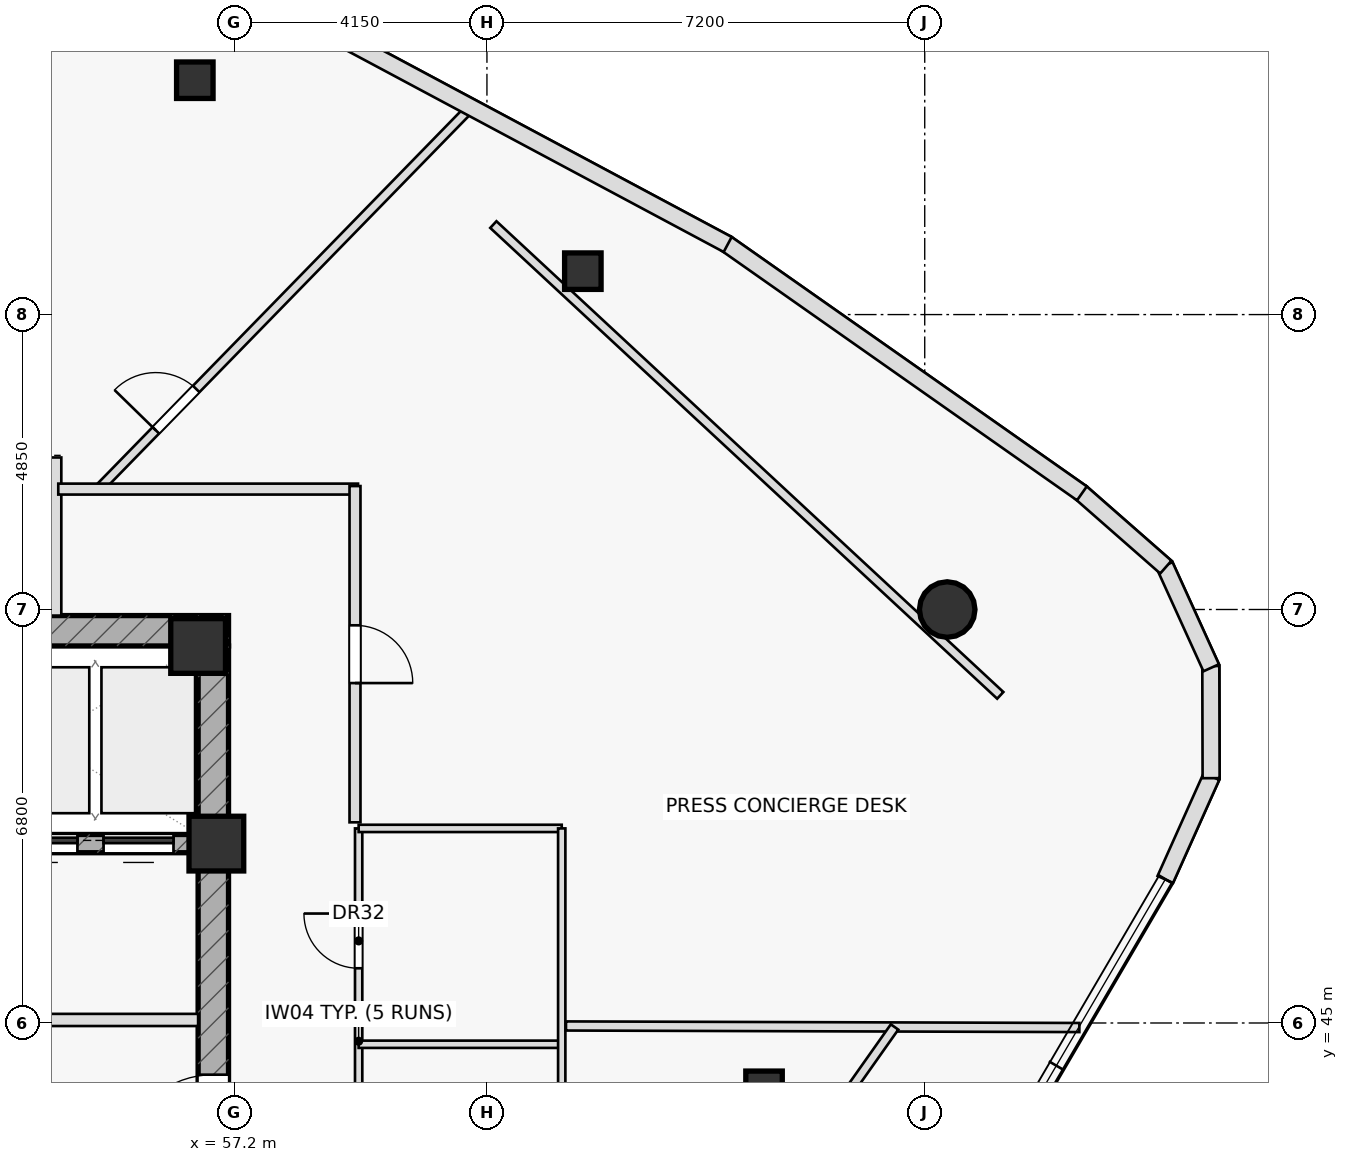
"""IFC4 building model, lengths in metres.
Left out: names, types, materials, properties, quantities, classifications, styles, units other than length and angle.
Written with IfcOpenShell. Run it as: python <this file> out.ifc"""

import sys

from ifc_helpers import new_model, si_unit, direction, frame, frame_2d, origin, origin_2d, place, context, subcontext, project, spatial, rectangle, hollow_rectangle, hollow_circle, extrude, element, fill, save


model = new_model("IFC4")
c1 = context("Model", 3, precision=1e-05, world=origin(), true_north=direction((0.0, 1.0)))
c2 = subcontext(c1, "Body", "Model", "MODEL_VIEW")
j1 = project(units=[si_unit("LENGTHUNIT", "METRE"), si_unit("PLANEANGLEUNIT", "RADIAN")], contexts=[c1])
p1 = place(None, origin())
s1 = spatial("IfcSite", under=j1, at=p1, CompositionType="ELEMENT")
p2 = place(p1, origin())
s2 = spatial("IfcBuilding", under=s1, at=p2, CompositionType="ELEMENT")
p3 = place(p2, frame((0.0, 0.0, 216.95)))
s3 = spatial("IfcBuildingStorey", under=s2, at=p3, CompositionType="ELEMENT", Elevation=216.95)
p4 = place(p3, frame((42.9, 51.45, 0.0), z_axis=(0.0, 0.0, 1.0), x_axis=(1.0, 0.0, 0.0)))
e1 = element("IfcWall", 1, at=p4, inside=s3, PredefinedType="SHEAR", context=c2, shape_type="SweptSolid", body=[
    extrude(rectangle(XDim=14.2, YDim=0.5, at=frame_2d((7.1, 0.0))), origin(), (0.0, 0.0, 1.0), 4.9),
])
p5 = place(p4, frame((0.78, 0.0, 0.0)))
e2 = element("IfcOpeningElement", 2, at=p5, cuts=e1, PredefinedType="OPENING", context=c2, shape_type="SweptSolid", body=[
    extrude(rectangle(XDim=1.05, YDim=2.2, at=frame_2d((0.525, 1.1))), frame((0.0, 0.26, 0.0), z_axis=(0.0, -1.0, 0.0), x_axis=(1.0, 0.0, 0.0)), (0.0, 0.0, 1.0), 0.52),
])
p6 = place(p3, frame((56.85, 38.8, 0.0), z_axis=(0.0, 0.0, 1.0), x_axis=(0.0, 1.0, 0.0)))
e3 = element("IfcWall", 3, at=p6, inside=s3, PredefinedType="SHEAR", context=c2, shape_type="SweptSolid", body=[
    extrude(rectangle(XDim=12.4, YDim=0.5, at=frame_2d((6.2, 0.0))), origin(), (0.0, 0.0, 1.0), 4.9),
])
p7 = place(p6, frame((3.85, 0.0, 0.0)))
e4 = element("IfcOpeningElement", 4, at=p7, cuts=e3, PredefinedType="OPENING", context=c2, shape_type="SweptSolid", body=[
    extrude(rectangle(XDim=1.5, YDim=2.2, at=frame_2d((0.75, 1.1))), frame((0.0, 0.26, 0.0), z_axis=(0.0, -1.0, 0.0), x_axis=(1.0, 0.0, 0.0)), (0.0, 0.0, 1.0), 0.52),
])
p8 = place(p3, frame((43.4, 47.95, 0.0), z_axis=(0.0, 0.0, 1.0), x_axis=(1.0, 0.0, 0.0)))
e5 = element("IfcWall", 5, at=p8, inside=s3, PredefinedType="SHEAR", context=c2, shape_type="SweptSolid", body=[
    extrude(rectangle(XDim=13.2, YDim=0.3, at=frame_2d((6.6, 0.0))), origin(), (0.0, 0.0, 1.0), 4.9),
])
p9 = place(p8, frame((8.345, 0.0, 0.0)))
e6 = element("IfcOpeningElement", 6, at=p9, cuts=e5, PredefinedType="OPENING", context=c2, shape_type="SweptSolid", body=[
    extrude(rectangle(XDim=1.15, YDim=2.2, at=frame_2d((0.575, 1.1))), frame((0.0, 0.16, 0.0), z_axis=(0.0, -1.0, 0.0), x_axis=(1.0, 0.0, 0.0)), (0.0, 0.0, 1.0), 0.32),
])
p10 = place(p8, frame((10.065, 0.0, 0.0)))
e7 = element("IfcOpeningElement", 7, at=p10, cuts=e5, PredefinedType="OPENING", context=c2, shape_type="SweptSolid", body=[
    extrude(rectangle(XDim=1.15, YDim=2.2, at=frame_2d((0.575, 1.1))), frame((0.0, 0.16, 0.0), z_axis=(0.0, -1.0, 0.0), x_axis=(1.0, 0.0, 0.0)), (0.0, 0.0, 1.0), 0.32),
])
p11 = place(p8, frame((11.645, 0.0, 0.0)))
e8 = element("IfcOpeningElement", 8, at=p11, cuts=e5, PredefinedType="OPENING", context=c2, shape_type="SweptSolid", body=[
    extrude(rectangle(XDim=1.15, YDim=2.2, at=frame_2d((0.575, 1.1))), frame((0.0, 0.16, 0.0), z_axis=(0.0, -1.0, 0.0), x_axis=(1.0, 0.0, 0.0)), (0.0, 0.0, 1.0), 0.32),
])
for number, where, z_axis, x_axis in (
    (9, (56.9, 47.95, 0.0), (0.0, 0.0, 1.0), (1.0, 0.0, 0.0)),
    (10, (56.6, 51.2, 0.0), (0.0, 0.0, 1.0), (1.0, 0.0, 0.0)),
):
    element("IfcColumn", number, at=place(p3, frame(where, z_axis=z_axis, x_axis=x_axis)), inside=s3, PredefinedType="COLUMN", context=c2, shape_type="SweptSolid", body=[
        extrude(rectangle(XDim=0.9, YDim=0.9, at=origin_2d()), origin(), (0.0, 0.0, 1.0), 4.9),
    ])
p12 = place(p3, frame((65.907, 43.909, 0.0), z_axis=(0.0, 0.0, 1.0), x_axis=(1.0, 0.0, 0.0)))
e11 = element("IfcColumn", 11, at=p12, inside=s3, PredefinedType="COLUMN", context=c2, shape_type="SweptSolid", body=[
    extrude(hollow_rectangle(XDim=0.6, YDim=0.6, WallThickness=0.036, at=origin_2d()), origin(), (0.0, 0.0, 1.0), 4.9),
])
p13 = place(p3, frame((68.92, 51.799, 0.0), z_axis=(0.0, 0.0, 1.0), x_axis=(1.0, 0.0, 0.0)))
e12 = element("IfcColumn", 12, at=p13, inside=s3, PredefinedType="COLUMN", context=c2, shape_type="SweptSolid", body=[
    extrude(hollow_circle(Radius=0.457, WallThickness=0.04, at=origin_2d()), origin(), (0.0, 0.0, 1.0), 4.9),
])
for number, where, z_axis, x_axis in (
    (13, (62.927, 57.364, 0.0), (0.0, 0.0, 1.0), (1.0, 0.0, 0.0)),
    (14, (56.546, 60.504, 0.0), (0.0, 0.0, 1.0), (1.0, 0.0, 0.0)),
):
    element("IfcColumn", number, at=place(p3, frame(where, z_axis=z_axis, x_axis=x_axis)), inside=s3, PredefinedType="COLUMN", context=c2, shape_type="SweptSolid", body=[
        extrude(hollow_rectangle(XDim=0.6, YDim=0.6, WallThickness=0.036, at=origin_2d()), origin(), (0.0, 0.0, 1.0), 4.9),
    ])
p14 = place(p3, frame((54.25, 51.7, 0.0), z_axis=(0.0, 0.0, 1.0), x_axis=(0.0, 1.0, 0.0)))
e15 = element("IfcWall", 15, at=p14, inside=s3, PredefinedType="PARTITIONING", context=c2, shape_type="SweptSolid", body=[
    extrude(rectangle(XDim=2.6, YDim=0.2, at=frame_2d((1.3, 0.0))), origin(), (0.0, 0.0, 1.0), 4.9),
])
p15 = place(p3, frame((50.65, 45.05, 0.0), z_axis=(0.0, 0.0, 1.0), x_axis=(1.0, 0.0, 0.0)))
e16 = element("IfcWall", 16, at=p15, inside=s3, PredefinedType="PARTITIONING", context=c2, shape_type="SweptSolid", body=[
    extrude(rectangle(XDim=5.95, YDim=0.2, at=frame_2d((2.975, 0.0))), origin(), (0.0, 0.0, 1.0), 4.9),
])
p16 = place(p15, frame((1.35, 0.0, 0.0)))
e17 = element("IfcOpeningElement", 17, at=p16, cuts=e16, PredefinedType="OPENING", context=c2, shape_type="SweptSolid", body=[
    extrude(rectangle(XDim=1.5, YDim=2.2, at=frame_2d((0.75, 1.1))), frame((0.0, 0.11, 0.0), z_axis=(0.0, -1.0, 0.0), x_axis=(1.0, 0.0, 0.0)), (0.0, 0.0, 1.0), 0.22),
])
p17 = place(p3, frame((69.792, 50.388, 0.0), z_axis=(0.0, 0.0, 1.0), x_axis=(-0.732769799181, 0.680476613418, 0.0)))
e18 = element("IfcWall", 18, at=p17, inside=s3, PredefinedType="PARTITIONING", context=c2, shape_type="SweptSolid", body=[
    extrude(rectangle(XDim=11.378, YDim=0.15, at=frame_2d((5.689, 0.0))), origin(), (0.0, 0.0, 1.0), 4.275),
])
p18 = place(p3, frame((59.24, 41.2, 0.0), z_axis=(0.0, 0.0, 1.0), x_axis=(0.0, 1.0, 0.0)))
e19 = element("IfcWall", 19, at=p18, inside=s3, PredefinedType="PARTITIONING", context=c2, shape_type="SweptSolid", body=[
    extrude(rectangle(XDim=7.0, YDim=0.12, at=frame_2d((3.5, 0.0))), origin(), (0.0, 0.0, 1.0), 4.9),
])
p19 = place(p18, frame((1.15, 0.0, 0.0)))
e20 = element("IfcOpeningElement", 20, at=p19, cuts=e19, PredefinedType="OPENING", context=c2, shape_type="SweptSolid", body=[
    extrude(rectangle(XDim=0.9, YDim=2.05, at=frame_2d((0.45, 1.025))), frame((0.0, 0.07, 0.0), z_axis=(0.0, -1.0, 0.0), x_axis=(1.0, 0.0, 0.0)), (0.0, 0.0, 1.0), 0.14),
])
p20 = place(p18, frame((4.7, 0.0, 0.0)))
e21 = element("IfcOpeningElement", 21, at=p20, cuts=e19, PredefinedType="OPENING", context=c2, shape_type="SweptSolid", body=[
    extrude(rectangle(XDim=0.9, YDim=2.05, at=frame_2d((0.45, 1.025))), frame((0.0, 0.07, 0.0), z_axis=(0.0, -1.0, 0.0), x_axis=(1.0, 0.0, 0.0)), (0.0, 0.0, 1.0), 0.14),
])
for number, where, z_axis, x_axis in (
    (22, (59.24, 44.65, 0.0), (0.0, 0.0, 1.0), (1.0, 0.0, 0.0)),
    (23, (59.24, 48.2, 0.0), (0.0, 0.0, 1.0), (1.0, 0.0, 0.0)),
):
    element("IfcWall", number, at=place(p3, frame(where, z_axis=z_axis, x_axis=x_axis)), inside=s3, PredefinedType="PARTITIONING", context=c2, shape_type="SweptSolid", body=[
        extrude(rectangle(XDim=3.34, YDim=0.12, at=frame_2d((1.67, 0.0))), origin(), (0.0, 0.0, 1.0), 4.9),
    ])
p21 = place(p3, frame((62.58, 41.2, 0.0), z_axis=(0.0, 0.0, 1.0), x_axis=(0.0, 1.0, 0.0)))
e24 = element("IfcWall", 24, at=p21, inside=s3, PredefinedType="PARTITIONING", context=c2, shape_type="SweptSolid", body=[
    extrude(rectangle(XDim=7.0, YDim=0.12, at=frame_2d((3.5, 0.0))), origin(), (0.0, 0.0, 1.0), 4.575),
])
p22 = place(p3, frame((62.65, 44.951, 0.0), z_axis=(0.0, 0.0, 1.0), x_axis=(0.999995390856, -0.003036159848, 0.0)))
e25 = element("IfcWall", 25, at=p22, inside=s3, PredefinedType="PARTITIONING", context=c2, shape_type="SweptSolid", body=[
    extrude(rectangle(XDim=8.443, YDim=0.15, at=frame_2d((4.222, 0.0))), origin(), (0.0, 0.0, 1.0), 4.385),
])
p23 = place(p3, frame((54.962, 53.78, 0.0), z_axis=(0.0, 0.0, 1.0), x_axis=(0.698183146772, 0.715919194856, 0.0)))
e26 = element("IfcWall", 26, at=p23, inside=s3, PredefinedType="PARTITIONING", context=c2, shape_type="SweptSolid", body=[
    extrude(rectangle(XDim=8.782, YDim=0.15, at=frame_2d((4.391, 0.0))), origin(), (0.0, 0.0, 1.0), 4.275),
])
p24 = place(p23, frame((1.35, 0.0, 0.0)))
e27 = element("IfcOpeningElement", 27, at=p24, cuts=e26, PredefinedType="OPENING", context=c2, shape_type="SweptSolid", body=[
    extrude(rectangle(XDim=0.95, YDim=2.05, at=frame_2d((0.475, 1.025))), frame((0.0, 0.085, 0.0), z_axis=(0.0, -1.0, 0.0), x_axis=(1.0, 0.0, 0.0)), (0.0, 0.0, 1.0), 0.17),
])
p25 = place(p3, frame((63.985, 39.174, 0.0), z_axis=(0.0, 0.0, 1.0), x_axis=(0.576874808599, 0.816832574769, 0.0)))
e28 = element("IfcWall", 28, at=p25, inside=s3, PredefinedType="PARTITIONING", context=c2, shape_type="SweptSolid", body=[
    extrude(rectangle(XDim=7.053, YDim=0.15, at=frame_2d((3.526, 0.0))), origin(), (0.0, 0.0, 1.0), 4.9),
])
p26 = place(p25, frame((3.052, 0.0, 0.0)))
e29 = element("IfcOpeningElement", 29, at=p26, cuts=e28, PredefinedType="OPENING", context=c2, shape_type="SweptSolid", body=[
    extrude(rectangle(XDim=0.95, YDim=2.05, at=frame_2d((0.475, 1.025))), frame((0.0, 0.085, 0.0), z_axis=(0.0, -1.0, 0.0), x_axis=(1.0, 0.0, 0.0)), (0.0, 0.0, 1.0), 0.17),
])
p27 = place(p3, frame((54.3, 53.78, 0.0), z_axis=(0.0, 0.0, 1.0), x_axis=(1.0, 0.0, 0.0)))
e30 = element("IfcWall", 30, at=p27, inside=s3, PredefinedType="PARTITIONING", context=c2, shape_type="SweptSolid", body=[
    extrude(rectangle(XDim=4.93, YDim=0.18, at=frame_2d((2.465, 0.0))), origin(), (0.0, 0.0, 1.0), 4.9),
])
p28 = place(p3, frame((59.18, 53.83, 0.0), z_axis=(0.0, 0.0, 1.0), x_axis=(0.0, -1.0, 0.0)))
e31 = element("IfcWall", 31, at=p28, inside=s3, PredefinedType="PARTITIONING", context=c2, shape_type="SweptSolid", body=[
    extrude(rectangle(XDim=5.53, YDim=0.18, at=frame_2d((2.765, 0.0))), origin(), (0.0, 0.0, 1.0), 4.9),
])
p29 = place(p28, frame((2.29, 0.0, 0.0)))
e32 = element("IfcOpeningElement", 32, at=p29, cuts=e31, PredefinedType="OPENING", context=c2, shape_type="SweptSolid", body=[
    extrude(rectangle(XDim=0.95, YDim=2.05, at=frame_2d((0.475, 1.025))), frame((0.0, 0.1, 0.0), z_axis=(0.0, -1.0, 0.0), x_axis=(1.0, 0.0, 0.0)), (0.0, 0.0, 1.0), 0.2),
])
p30 = place(p3, frame((72.507, 47.361, 0.0), z_axis=(0.0, 0.0, 1.0), x_axis=(0.409150307884, 0.912466999709, 0.0)))
e33 = element("IfcWall", 33, at=p30, inside=s3, PredefinedType="STANDARD", context=c2, shape_type="SweptSolid", body=[
    extrude(rectangle(XDim=1.856, YDim=0.28, at=frame_2d((0.928, 0.0))), origin(), (0.0, 0.0, 1.0), 4.9),
])
for number, where, z_axis, x_axis in (
    (34, (73.26, 49.026, 0.0), (0.0, 0.0, 1.0), (-0.003, 1.0, 0.0)),
    (35, (73.261, 50.842, 0.0), (0.0, 0.0, 1.0), (-0.414, 0.91, 0.0)),
):
    element("IfcWall", number, at=place(p3, frame(where, z_axis=z_axis, x_axis=x_axis)), inside=s3, PredefinedType="STANDARD", context=c2, shape_type="SweptSolid", body=[
        extrude(rectangle(XDim=1.844, YDim=0.28, at=frame_2d((0.922, 0.0))), origin(), (0.0, 0.0, 1.0), 4.9),
    ])
p31 = place(p3, frame((72.515, 52.497, 0.0), z_axis=(0.0, 0.0, 1.0), x_axis=(-0.751879649431, 0.659300381292, 0.0)))
e36 = element("IfcWall", 36, at=p31, inside=s3, PredefinedType="STANDARD", context=c2, shape_type="SweptSolid", body=[
    extrude(rectangle(XDim=1.867, YDim=0.28, at=frame_2d((0.934, 0.0))), origin(), (0.0, 0.0, 1.0), 4.9),
])
p32 = place(p3, frame((71.135, 53.71, 0.0), z_axis=(0.0, 0.0, 1.0), x_axis=(-0.818379197985, 0.574678595656, 0.0)))
e37 = element("IfcWall", 37, at=p32, inside=s3, PredefinedType="STANDARD", context=c2, shape_type="SweptSolid", body=[
    extrude(rectangle(XDim=7.15, YDim=0.28, at=frame_2d((3.575, 0.0))), origin(), (0.0, 0.0, 1.0), 4.9),
])
p33 = place(p3, frame((65.309, 57.803, 0.0), z_axis=(0.0, 0.0, 1.0), x_axis=(-0.881918919903, 0.471401122948, 0.0)))
e38 = element("IfcWall", 38, at=p33, inside=s3, PredefinedType="STANDARD", context=c2, shape_type="SweptSolid", body=[
    extrude(rectangle(XDim=7.138, YDim=0.28, at=frame_2d((3.569, 0.0))), origin(), (0.0, 0.0, 1.0), 4.9),
])
p34 = place(p7, origin())
e39 = element("IfcDoor", 39, at=p34, inside=s3, OperationType="SINGLE_SWING_LEFT", PredefinedType="DOOR", context=c2, shape_type="SweptSolid", body=[
    extrude(rectangle(XDim=1.5, YDim=2.2, at=frame_2d((0.75, 1.1))), frame((0.0, 0.025, 0.0), z_axis=(0.0, -1.0, 0.0), x_axis=(1.0, 0.0, 0.0)), (0.0, 0.0, 1.0), 0.05),
])
fill(e4, e39)
p35 = place(p20, origin())
e40 = element("IfcDoor", 40, at=p35, inside=s3, OperationType="SINGLE_SWING_RIGHT", PredefinedType="DOOR", context=c2, shape_type="SweptSolid", body=[
    extrude(rectangle(XDim=0.9, YDim=2.05, at=frame_2d((0.45, 1.025))), frame((0.0, 0.025, 0.0), z_axis=(0.0, -1.0, 0.0), x_axis=(1.0, 0.0, 0.0)), (0.0, 0.0, 1.0), 0.05),
])
fill(e21, e40)
p36 = place(p24, origin())
e41 = element("IfcDoor", 41, at=p36, inside=s3, OperationType="SINGLE_SWING_LEFT", PredefinedType="DOOR", context=c2, shape_type="SweptSolid", body=[
    extrude(rectangle(XDim=0.95, YDim=2.05, at=frame_2d((0.475, 1.025))), frame((0.0, 0.025, 0.0), z_axis=(0.0, -1.0, 0.0), x_axis=(1.0, 0.0, 0.0)), (0.0, 0.0, 1.0), 0.05),
])
fill(e27, e41)
p37 = place(p29, origin())
e42 = element("IfcDoor", 42, at=p37, inside=s3, OperationType="SINGLE_SWING_RIGHT", PredefinedType="DOOR", context=c2, shape_type="SweptSolid", body=[
    extrude(rectangle(XDim=0.95, YDim=2.05, at=frame_2d((0.475, 1.025))), frame((0.0, 0.025, 0.0), z_axis=(0.0, -1.0, 0.0), x_axis=(1.0, 0.0, 0.0)), (0.0, 0.0, 1.0), 0.05),
])
fill(e32, e42)
p38 = place(p10, origin())
e43 = element("IfcDoor", 43, at=p38, inside=s3, OperationType="SLIDING_TO_LEFT", PredefinedType="DOOR", context=c2, shape_type="SweptSolid", body=[
    extrude(rectangle(XDim=1.15, YDim=2.2, at=frame_2d((0.575, 1.1))), frame((0.0, 0.025, 0.0), z_axis=(0.0, -1.0, 0.0), x_axis=(1.0, 0.0, 0.0)), (0.0, 0.0, 1.0), 0.05),
])
fill(e7, e43)
p39 = place(p11, origin())
e44 = element("IfcDoor", 44, at=p39, inside=s3, OperationType="SLIDING_TO_LEFT", PredefinedType="DOOR", context=c2, shape_type="SweptSolid", body=[
    extrude(rectangle(XDim=1.15, YDim=2.2, at=frame_2d((0.575, 1.1))), frame((0.0, 0.025, 0.0), z_axis=(0.0, -1.0, 0.0), x_axis=(1.0, 0.0, 0.0)), (0.0, 0.0, 1.0), 0.05),
])
fill(e8, e44)
save(model, sys.argv[1])
